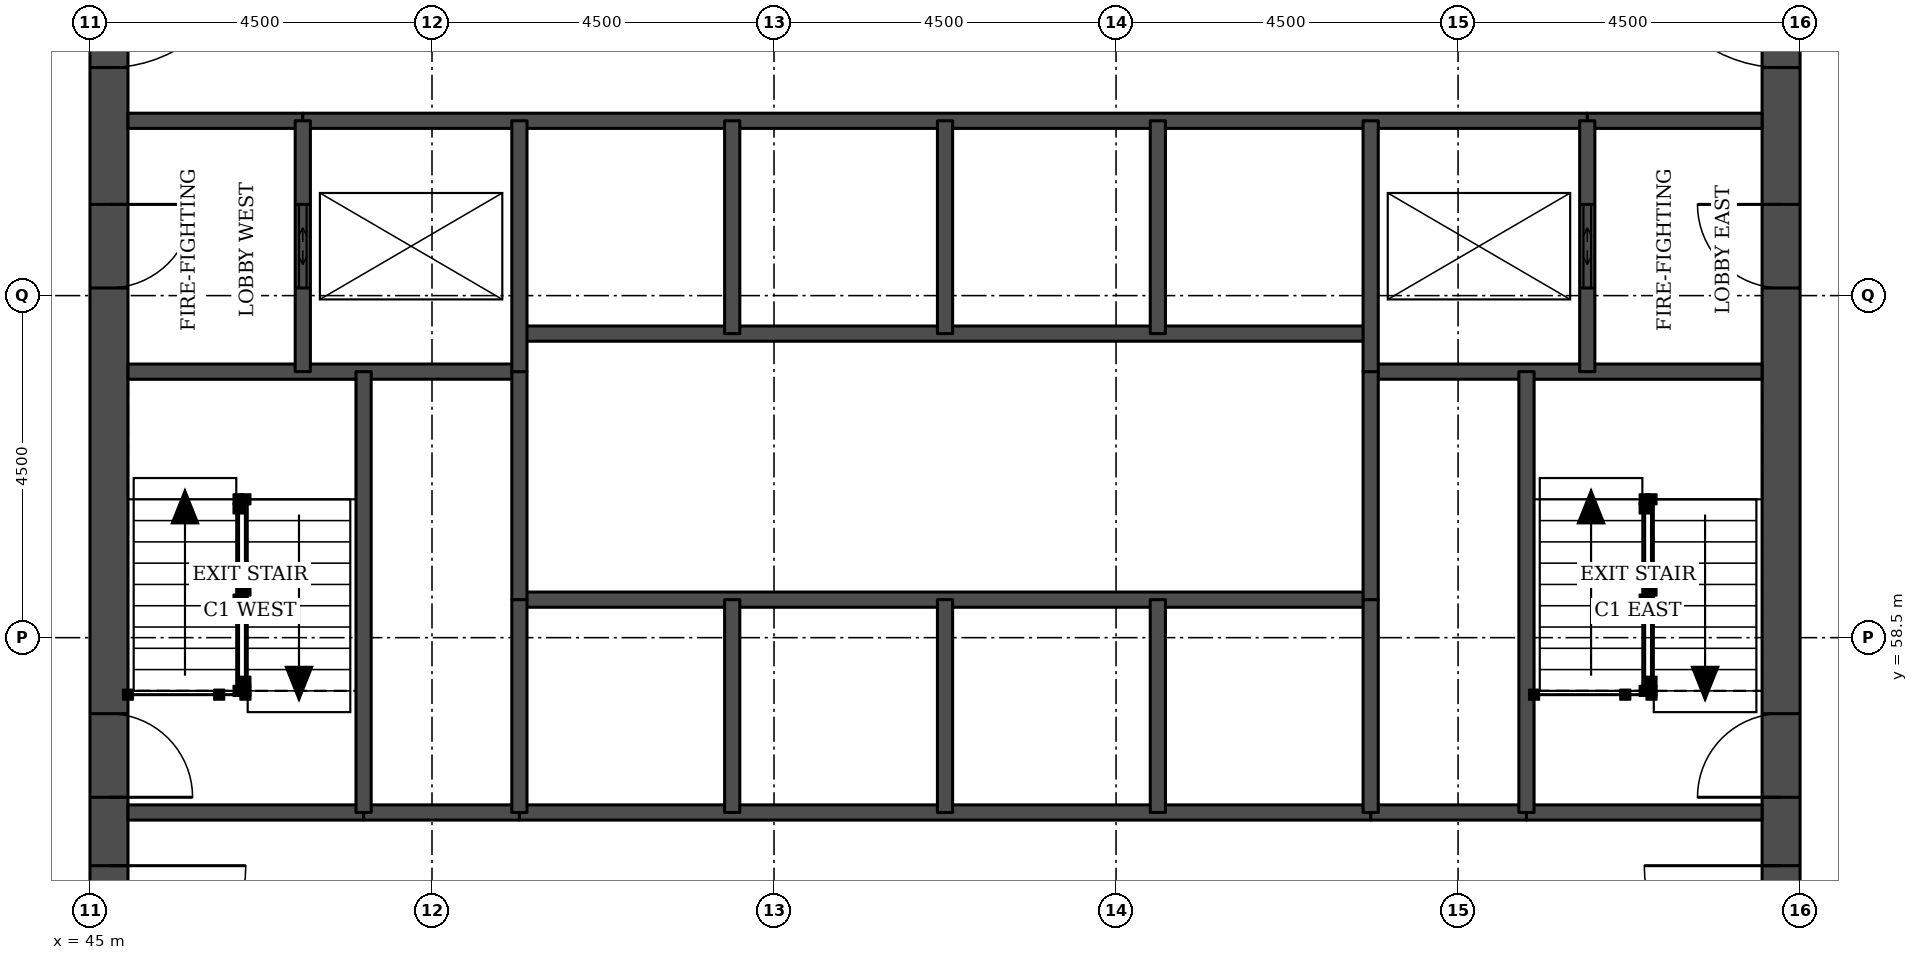
"""IFC4 building model, lengths in metres.
Left out: names, types, materials, properties, quantities, classifications, styles, units other than length and angle.
Written with IfcOpenShell. Run it as: python <this file> out.ifc"""

import sys

from ifc_helpers import new_model, si_unit, direction, frame, frame_2d, origin, place, context, subcontext, project, spatial, rectangle, extrude, element, fill, save


model = new_model("IFC4")
c1 = context("Model", 3, precision=1e-05, world=origin(), true_north=direction((0.0, 1.0)))
c2 = subcontext(c1, "Body", "Model", "MODEL_VIEW")
j1 = project(units=[si_unit("LENGTHUNIT", "METRE"), si_unit("PLANEANGLEUNIT", "RADIAN")], contexts=[c1])
p1 = place(None, origin())
s1 = spatial("IfcSite", under=j1, at=p1, CompositionType="ELEMENT")
p2 = place(p1, origin())
s2 = spatial("IfcBuilding", under=s1, at=p2, CompositionType="ELEMENT")
p3 = place(p2, frame((0.0, 0.0, 66.0)))
s3 = spatial("IfcBuildingStorey", under=s2, at=p3, CompositionType="ELEMENT", Elevation=66.0)
p4 = place(p3, frame((45.25, 49.5, 0.0), z_axis=(0.0, 0.0, 1.0), x_axis=(0.0, 1.0, 0.0)))
e1 = element("IfcWall", 1, at=p4, inside=s3, PredefinedType="SHEAR", context=c2, shape_type="SweptSolid", body=[
    extrude(rectangle(XDim=22.5, YDim=0.5, at=frame_2d((11.25, 0.0))), origin(), (0.0, 0.0, 1.0), 3.3),
])
p5 = place(p4, frame((4.2, 0.0, 0.0)))
e2 = element("IfcOpeningElement", 2, at=p5, cuts=e1, PredefinedType="OPENING", context=c2, shape_type="SweptSolid", body=[
    extrude(rectangle(XDim=1.8, YDim=2.1, at=frame_2d((0.9, 1.05))), frame((0.0, 0.26, 0.0), z_axis=(0.0, -1.0, 0.0), x_axis=(1.0, 0.0, 0.0)), (0.0, 0.0, 1.0), 0.52),
])
p6 = place(p4, frame((6.9, 0.0, 0.0)))
e3 = element("IfcOpeningElement", 3, at=p6, cuts=e1, PredefinedType="OPENING", context=c2, shape_type="SweptSolid", body=[
    extrude(rectangle(XDim=1.1, YDim=2.1, at=frame_2d((0.55, 1.05))), frame((0.0, 0.26, 0.0), z_axis=(0.0, -1.0, 0.0), x_axis=(1.0, 0.0, 0.0)), (0.0, 0.0, 1.0), 0.52),
])
p7 = place(p4, frame((13.6, 0.0, 0.0)))
e4 = element("IfcOpeningElement", 4, at=p7, cuts=e1, PredefinedType="OPENING", context=c2, shape_type="SweptSolid", body=[
    extrude(rectangle(XDim=1.1, YDim=2.1, at=frame_2d((0.55, 1.05))), frame((0.0, 0.26, 0.0), z_axis=(0.0, -1.0, 0.0), x_axis=(1.0, 0.0, 0.0)), (0.0, 0.0, 1.0), 0.52),
])
p8 = place(p4, frame((16.5, 0.0, 0.0)))
e5 = element("IfcOpeningElement", 5, at=p8, cuts=e1, PredefinedType="OPENING", context=c2, shape_type="SweptSolid", body=[
    extrude(rectangle(XDim=1.8, YDim=2.1, at=frame_2d((0.9, 1.05))), frame((0.0, 0.26, 0.0), z_axis=(0.0, -1.0, 0.0), x_axis=(1.0, 0.0, 0.0)), (0.0, 0.0, 1.0), 0.52),
])
p9 = place(p3, frame((67.25, 49.5, 0.0), z_axis=(0.0, 0.0, 1.0), x_axis=(0.0, 1.0, 0.0)))
e6 = element("IfcWall", 6, at=p9, inside=s3, PredefinedType="SHEAR", context=c2, shape_type="SweptSolid", body=[
    extrude(rectangle(XDim=22.5, YDim=0.5, at=frame_2d((11.25, 0.0))), origin(), (0.0, 0.0, 1.0), 3.3),
])
p10 = place(p9, frame((4.2, 0.0, 0.0)))
e7 = element("IfcOpeningElement", 7, at=p10, cuts=e6, PredefinedType="OPENING", context=c2, shape_type="SweptSolid", body=[
    extrude(rectangle(XDim=1.8, YDim=2.1, at=frame_2d((0.9, 1.05))), frame((0.0, 0.26, 0.0), z_axis=(0.0, -1.0, 0.0), x_axis=(1.0, 0.0, 0.0)), (0.0, 0.0, 1.0), 0.52),
])
p11 = place(p9, frame((6.9, 0.0, 0.0)))
e8 = element("IfcOpeningElement", 8, at=p11, cuts=e6, PredefinedType="OPENING", context=c2, shape_type="SweptSolid", body=[
    extrude(rectangle(XDim=1.1, YDim=2.1, at=frame_2d((0.55, 1.05))), frame((0.0, 0.26, 0.0), z_axis=(0.0, -1.0, 0.0), x_axis=(1.0, 0.0, 0.0)), (0.0, 0.0, 1.0), 0.52),
])
p12 = place(p9, frame((13.6, 0.0, 0.0)))
e9 = element("IfcOpeningElement", 9, at=p12, cuts=e6, PredefinedType="OPENING", context=c2, shape_type="SweptSolid", body=[
    extrude(rectangle(XDim=1.1, YDim=2.1, at=frame_2d((0.55, 1.05))), frame((0.0, 0.26, 0.0), z_axis=(0.0, -1.0, 0.0), x_axis=(1.0, 0.0, 0.0)), (0.0, 0.0, 1.0), 0.52),
])
p13 = place(p9, frame((16.5, 0.0, 0.0)))
e10 = element("IfcOpeningElement", 10, at=p13, cuts=e6, PredefinedType="OPENING", context=c2, shape_type="SweptSolid", body=[
    extrude(rectangle(XDim=1.8, YDim=2.1, at=frame_2d((0.9, 1.05))), frame((0.0, 0.26, 0.0), z_axis=(0.0, -1.0, 0.0), x_axis=(1.0, 0.0, 0.0)), (0.0, 0.0, 1.0), 0.52),
])
for number, where, z_axis, x_axis in (
    (11, (48.6, 56.2, 0.0), (0.0, 0.0, 1.0), (1.0, 0.0, 0.0)),
    (12, (61.85, 56.2, 0.0), (0.0, 0.0, 1.0), (1.0, 0.0, 0.0)),
):
    element("IfcWall", number, at=place(p3, frame(where, z_axis=z_axis, x_axis=x_axis)), inside=s3, PredefinedType="SOLIDWALL", context=c2, shape_type="SweptSolid", body=[
        extrude(rectangle(XDim=2.05, YDim=0.2, at=frame_2d((1.025, 0.0))), origin(), (0.0, 0.0, 1.0), 3.08),
    ])
p14 = place(p3, frame((45.5, 56.2, 0.0), z_axis=(0.0, 0.0, 1.0), x_axis=(1.0, 0.0, 0.0)))
e13 = element("IfcWall", 13, at=p14, inside=s3, PredefinedType="SOLIDWALL", context=c2, shape_type="SweptSolid", body=[
    extrude(rectangle(XDim=3.1, YDim=0.2, at=frame_2d((1.55, 0.0))), origin(), (0.0, 0.0, 1.0), 3.08),
])
p15 = place(p3, frame((50.65, 56.2, 0.0), z_axis=(0.0, 0.0, 1.0), x_axis=(1.0, 0.0, 0.0)))
e14 = element("IfcWall", 14, at=p15, inside=s3, PredefinedType="SOLIDWALL", context=c2, shape_type="SweptSolid", body=[
    extrude(rectangle(XDim=11.2, YDim=0.2, at=frame_2d((5.6, 0.0))), origin(), (0.0, 0.0, 1.0), 3.08),
])
p16 = place(p3, frame((63.9, 56.2, 0.0), z_axis=(0.0, 0.0, 1.0), x_axis=(1.0, 0.0, 0.0)))
e15 = element("IfcWall", 15, at=p16, inside=s3, PredefinedType="SOLIDWALL", context=c2, shape_type="SweptSolid", body=[
    extrude(rectangle(XDim=3.1, YDim=0.2, at=frame_2d((1.55, 0.0))), origin(), (0.0, 0.0, 1.0), 3.08),
])
p17 = place(p3, frame((50.65, 59.0, 0.0), z_axis=(0.0, 0.0, 1.0), x_axis=(1.0, 0.0, 0.0)))
e16 = element("IfcWall", 16, at=p17, inside=s3, PredefinedType="SOLIDWALL", context=c2, shape_type="SweptSolid", body=[
    extrude(rectangle(XDim=11.2, YDim=0.2, at=frame_2d((5.6, 0.0))), origin(), (0.0, 0.0, 1.0), 3.3),
])
for number, where, z_axis, x_axis in (
    (17, (45.5, 62.0, 0.0), (0.0, 0.0, 1.0), (1.0, 0.0, 0.0)),
    (18, (61.85, 62.0, 0.0), (0.0, 0.0, 1.0), (1.0, 0.0, 0.0)),
):
    element("IfcWall", number, at=place(p3, frame(where, z_axis=z_axis, x_axis=x_axis)), inside=s3, PredefinedType="SOLIDWALL", context=c2, shape_type="SweptSolid", body=[
        extrude(rectangle(XDim=5.15, YDim=0.2, at=frame_2d((2.575, 0.0))), origin(), (0.0, 0.0, 1.0), 3.08),
    ])
p18 = place(p3, frame((50.65, 62.5, 0.0), z_axis=(0.0, 0.0, 1.0), x_axis=(1.0, 0.0, 0.0)))
e19 = element("IfcWall", 19, at=p18, inside=s3, PredefinedType="SOLIDWALL", context=c2, shape_type="SweptSolid", body=[
    extrude(rectangle(XDim=11.2, YDim=0.2, at=frame_2d((5.6, 0.0))), origin(), (0.0, 0.0, 1.0), 3.3),
])
for number, where, z_axis, x_axis in (
    (20, (45.5, 65.3, 0.0), (0.0, 0.0, 1.0), (1.0, 0.0, 0.0)),
    (21, (64.7, 65.3, 0.0), (0.0, 0.0, 1.0), (1.0, 0.0, 0.0)),
):
    element("IfcWall", number, at=place(p3, frame(where, z_axis=z_axis, x_axis=x_axis)), inside=s3, PredefinedType="SOLIDWALL", context=c2, shape_type="SweptSolid", body=[
        extrude(rectangle(XDim=2.3, YDim=0.2, at=frame_2d((1.15, 0.0))), origin(), (0.0, 0.0, 1.0), 3.08),
    ])
p19 = place(p3, frame((47.8, 65.3, 0.0), z_axis=(0.0, 0.0, 1.0), x_axis=(1.0, 0.0, 0.0)))
e22 = element("IfcWall", 22, at=p19, inside=s3, PredefinedType="SOLIDWALL", context=c2, shape_type="SweptSolid", body=[
    extrude(rectangle(XDim=16.9, YDim=0.2, at=frame_2d((8.45, 0.0))), origin(), (0.0, 0.0, 1.0), 3.08),
])
p20 = place(p3, frame((47.8, 62.0, 0.0), z_axis=(0.0, 0.0, 1.0), x_axis=(0.0, 1.0, 0.0)))
e23 = element("IfcWall", 23, at=p20, inside=s3, PredefinedType="SOLIDWALL", context=c2, shape_type="SweptSolid", body=[
    extrude(rectangle(XDim=3.3, YDim=0.2, at=frame_2d((1.65, 0.0))), origin(), (0.0, 0.0, 1.0), 3.08),
])
p21 = place(p20, frame((1.1, 0.0, 0.0)))
e24 = element("IfcOpeningElement", 24, at=p21, cuts=e23, PredefinedType="OPENING", context=c2, shape_type="SweptSolid", body=[
    extrude(rectangle(XDim=1.1, YDim=2.1, at=frame_2d((0.55, 1.05))), frame((0.0, 0.11, 0.0), z_axis=(0.0, -1.0, 0.0), x_axis=(1.0, 0.0, 0.0)), (0.0, 0.0, 1.0), 0.22),
])
p22 = place(p3, frame((48.6, 56.2, 0.0), z_axis=(0.0, 0.0, 1.0), x_axis=(0.0, 1.0, 0.0)))
e25 = element("IfcWall", 25, at=p22, inside=s3, PredefinedType="SOLIDWALL", context=c2, shape_type="SweptSolid", body=[
    extrude(rectangle(XDim=5.8, YDim=0.2, at=frame_2d((2.9, 0.0))), origin(), (0.0, 0.0, 1.0), 3.08),
])
p23 = place(p3, frame((50.65, 59.0, 0.0), z_axis=(0.0, 0.0, 1.0), x_axis=(0.0, 1.0, 0.0)))
e26 = element("IfcWall", 26, at=p23, inside=s3, PredefinedType="SOLIDWALL", context=c2, shape_type="SweptSolid", body=[
    extrude(rectangle(XDim=3.0, YDim=0.2, at=frame_2d((1.5, 0.0))), origin(), (0.0, 0.0, 1.0), 3.3),
])
p24 = place(p3, frame((50.65, 56.2, 0.0), z_axis=(0.0, 0.0, 1.0), x_axis=(0.0, 1.0, 0.0)))
e27 = element("IfcWall", 27, at=p24, inside=s3, PredefinedType="SOLIDWALL", context=c2, shape_type="SweptSolid", body=[
    extrude(rectangle(XDim=2.8, YDim=0.2, at=frame_2d((1.4, 0.0))), origin(), (0.0, 0.0, 1.0), 3.08),
])
p25 = place(p3, frame((50.65, 62.0, 0.0), z_axis=(0.0, 0.0, 1.0), x_axis=(0.0, 1.0, 0.0)))
e28 = element("IfcWall", 28, at=p25, inside=s3, PredefinedType="SOLIDWALL", context=c2, shape_type="SweptSolid", body=[
    extrude(rectangle(XDim=3.3, YDim=0.2, at=frame_2d((1.65, 0.0))), origin(), (0.0, 0.0, 1.0), 3.08),
])
for number, where, z_axis, x_axis in (
    (29, (53.45, 56.2, 0.0), (0.0, 0.0, 1.0), (0.0, 1.0, 0.0)),
    (30, (53.45, 62.5, 0.0), (0.0, 0.0, 1.0), (0.0, 1.0, 0.0)),
    (31, (56.25, 56.2, 0.0), (0.0, 0.0, 1.0), (0.0, 1.0, 0.0)),
    (32, (56.25, 62.5, 0.0), (0.0, 0.0, 1.0), (0.0, 1.0, 0.0)),
    (33, (59.05, 56.2, 0.0), (0.0, 0.0, 1.0), (0.0, 1.0, 0.0)),
    (34, (59.05, 62.5, 0.0), (0.0, 0.0, 1.0), (0.0, 1.0, 0.0)),
):
    element("IfcWall", number, at=place(p3, frame(where, z_axis=z_axis, x_axis=x_axis)), inside=s3, PredefinedType="SOLIDWALL", context=c2, shape_type="SweptSolid", body=[
        extrude(rectangle(XDim=2.8, YDim=0.2, at=frame_2d((1.4, 0.0))), origin(), (0.0, 0.0, 1.0), 3.08),
    ])
p26 = place(p3, frame((61.85, 59.0, 0.0), z_axis=(0.0, 0.0, 1.0), x_axis=(0.0, 1.0, 0.0)))
e35 = element("IfcWall", 35, at=p26, inside=s3, PredefinedType="SOLIDWALL", context=c2, shape_type="SweptSolid", body=[
    extrude(rectangle(XDim=3.0, YDim=0.2, at=frame_2d((1.5, 0.0))), origin(), (0.0, 0.0, 1.0), 3.3),
])
p27 = place(p3, frame((61.85, 56.2, 0.0), z_axis=(0.0, 0.0, 1.0), x_axis=(0.0, 1.0, 0.0)))
e36 = element("IfcWall", 36, at=p27, inside=s3, PredefinedType="SOLIDWALL", context=c2, shape_type="SweptSolid", body=[
    extrude(rectangle(XDim=2.8, YDim=0.2, at=frame_2d((1.4, 0.0))), origin(), (0.0, 0.0, 1.0), 3.08),
])
p28 = place(p3, frame((61.85, 62.0, 0.0), z_axis=(0.0, 0.0, 1.0), x_axis=(0.0, 1.0, 0.0)))
e37 = element("IfcWall", 37, at=p28, inside=s3, PredefinedType="SOLIDWALL", context=c2, shape_type="SweptSolid", body=[
    extrude(rectangle(XDim=3.3, YDim=0.2, at=frame_2d((1.65, 0.0))), origin(), (0.0, 0.0, 1.0), 3.08),
])
p29 = place(p3, frame((63.9, 56.2, 0.0), z_axis=(0.0, 0.0, 1.0), x_axis=(0.0, 1.0, 0.0)))
e38 = element("IfcWall", 38, at=p29, inside=s3, PredefinedType="SOLIDWALL", context=c2, shape_type="SweptSolid", body=[
    extrude(rectangle(XDim=5.8, YDim=0.2, at=frame_2d((2.9, 0.0))), origin(), (0.0, 0.0, 1.0), 3.08),
])
p30 = place(p3, frame((64.7, 62.0, 0.0), z_axis=(0.0, 0.0, 1.0), x_axis=(0.0, 1.0, 0.0)))
e39 = element("IfcWall", 39, at=p30, inside=s3, PredefinedType="SOLIDWALL", context=c2, shape_type="SweptSolid", body=[
    extrude(rectangle(XDim=3.3, YDim=0.2, at=frame_2d((1.65, 0.0))), origin(), (0.0, 0.0, 1.0), 3.08),
])
p31 = place(p30, frame((1.1, 0.0, 0.0)))
e40 = element("IfcOpeningElement", 40, at=p31, cuts=e39, PredefinedType="OPENING", context=c2, shape_type="SweptSolid", body=[
    extrude(rectangle(XDim=1.1, YDim=2.1, at=frame_2d((0.55, 1.05))), frame((0.0, 0.11, 0.0), z_axis=(0.0, -1.0, 0.0), x_axis=(1.0, 0.0, 0.0)), (0.0, 0.0, 1.0), 0.22),
])
p32 = place(p21, origin())
e41 = element("IfcDoor", 41, at=p32, inside=s3, OperationType="DOUBLE_DOOR_SLIDING", PredefinedType="DOOR", context=c2, shape_type="SweptSolid", body=[
    extrude(rectangle(XDim=1.1, YDim=2.1, at=frame_2d((0.55, 1.05))), frame((0.0, 0.025, 0.0), z_axis=(0.0, -1.0, 0.0), x_axis=(1.0, 0.0, 0.0)), (0.0, 0.0, 1.0), 0.05),
])
fill(e24, e41)
p33 = place(p31, origin())
e42 = element("IfcDoor", 42, at=p33, inside=s3, OperationType="DOUBLE_DOOR_SLIDING", PredefinedType="DOOR", context=c2, shape_type="SweptSolid", body=[
    extrude(rectangle(XDim=1.1, YDim=2.1, at=frame_2d((0.55, 1.05))), frame((0.0, 0.025, 0.0), z_axis=(0.0, -1.0, 0.0), x_axis=(1.0, 0.0, 0.0)), (0.0, 0.0, 1.0), 0.05),
])
fill(e40, e42)
p34 = place(p5, frame((1.8, 0.0, 0.0), z_axis=(0.0, 0.0, 1.0), x_axis=(-1.0, 0.0, 0.0)))
e43 = element("IfcDoor", 43, at=p34, inside=s3, OperationType="SINGLE_SWING_LEFT", PredefinedType="DOOR", context=c2, shape_type="SweptSolid", body=[
    extrude(rectangle(XDim=1.8, YDim=2.1, at=frame_2d((0.9, 1.05))), frame((0.0, 0.025, 0.0), z_axis=(0.0, -1.0, 0.0), x_axis=(1.0, 0.0, 0.0)), (0.0, 0.0, 1.0), 0.05),
])
fill(e2, e43)
p35 = place(p6, frame((1.1, 0.0, 0.0), z_axis=(0.0, 0.0, 1.0), x_axis=(-1.0, 0.0, 0.0)))
e44 = element("IfcDoor", 44, at=p35, inside=s3, OperationType="SINGLE_SWING_RIGHT", PredefinedType="DOOR", context=c2, shape_type="SweptSolid", body=[
    extrude(rectangle(XDim=1.1, YDim=2.1, at=frame_2d((0.55, 1.05))), frame((0.0, 0.025, 0.0), z_axis=(0.0, -1.0, 0.0), x_axis=(1.0, 0.0, 0.0)), (0.0, 0.0, 1.0), 0.05),
])
fill(e3, e44)
p36 = place(p7, frame((1.1, 0.0, 0.0), z_axis=(0.0, 0.0, 1.0), x_axis=(-1.0, 0.0, 0.0)))
e45 = element("IfcDoor", 45, at=p36, inside=s3, OperationType="SINGLE_SWING_LEFT", PredefinedType="DOOR", context=c2, shape_type="SweptSolid", body=[
    extrude(rectangle(XDim=1.1, YDim=2.1, at=frame_2d((0.55, 1.05))), frame((0.0, 0.025, 0.0), z_axis=(0.0, -1.0, 0.0), x_axis=(1.0, 0.0, 0.0)), (0.0, 0.0, 1.0), 0.05),
])
fill(e4, e45)
p37 = place(p8, frame((1.8, 0.0, 0.0), z_axis=(0.0, 0.0, 1.0), x_axis=(-1.0, 0.0, 0.0)))
e46 = element("IfcDoor", 46, at=p37, inside=s3, OperationType="SINGLE_SWING_LEFT", PredefinedType="DOOR", context=c2, shape_type="SweptSolid", body=[
    extrude(rectangle(XDim=1.8, YDim=2.1, at=frame_2d((0.9, 1.05))), frame((0.0, 0.025, 0.0), z_axis=(0.0, -1.0, 0.0), x_axis=(1.0, 0.0, 0.0)), (0.0, 0.0, 1.0), 0.05),
])
fill(e5, e46)
p38 = place(p10, origin())
e47 = element("IfcDoor", 47, at=p38, inside=s3, OperationType="SINGLE_SWING_RIGHT", PredefinedType="DOOR", context=c2, shape_type="SweptSolid", body=[
    extrude(rectangle(XDim=1.8, YDim=2.1, at=frame_2d((0.9, 1.05))), frame((0.0, 0.025, 0.0), z_axis=(0.0, -1.0, 0.0), x_axis=(1.0, 0.0, 0.0)), (0.0, 0.0, 1.0), 0.05),
])
fill(e7, e47)
p39 = place(p11, origin())
e48 = element("IfcDoor", 48, at=p39, inside=s3, OperationType="SINGLE_SWING_LEFT", PredefinedType="DOOR", context=c2, shape_type="SweptSolid", body=[
    extrude(rectangle(XDim=1.1, YDim=2.1, at=frame_2d((0.55, 1.05))), frame((0.0, 0.025, 0.0), z_axis=(0.0, -1.0, 0.0), x_axis=(1.0, 0.0, 0.0)), (0.0, 0.0, 1.0), 0.05),
])
fill(e8, e48)
p40 = place(p12, origin())
e49 = element("IfcDoor", 49, at=p40, inside=s3, OperationType="SINGLE_SWING_RIGHT", PredefinedType="DOOR", context=c2, shape_type="SweptSolid", body=[
    extrude(rectangle(XDim=1.1, YDim=2.1, at=frame_2d((0.55, 1.05))), frame((0.0, 0.025, 0.0), z_axis=(0.0, -1.0, 0.0), x_axis=(1.0, 0.0, 0.0)), (0.0, 0.0, 1.0), 0.05),
])
fill(e9, e49)
p41 = place(p13, origin())
e50 = element("IfcDoor", 50, at=p41, inside=s3, OperationType="SINGLE_SWING_RIGHT", PredefinedType="DOOR", context=c2, shape_type="SweptSolid", body=[
    extrude(rectangle(XDim=1.8, YDim=2.1, at=frame_2d((0.9, 1.05))), frame((0.0, 0.025, 0.0), z_axis=(0.0, -1.0, 0.0), x_axis=(1.0, 0.0, 0.0)), (0.0, 0.0, 1.0), 0.05),
])
fill(e10, e50)
save(model, sys.argv[1])
